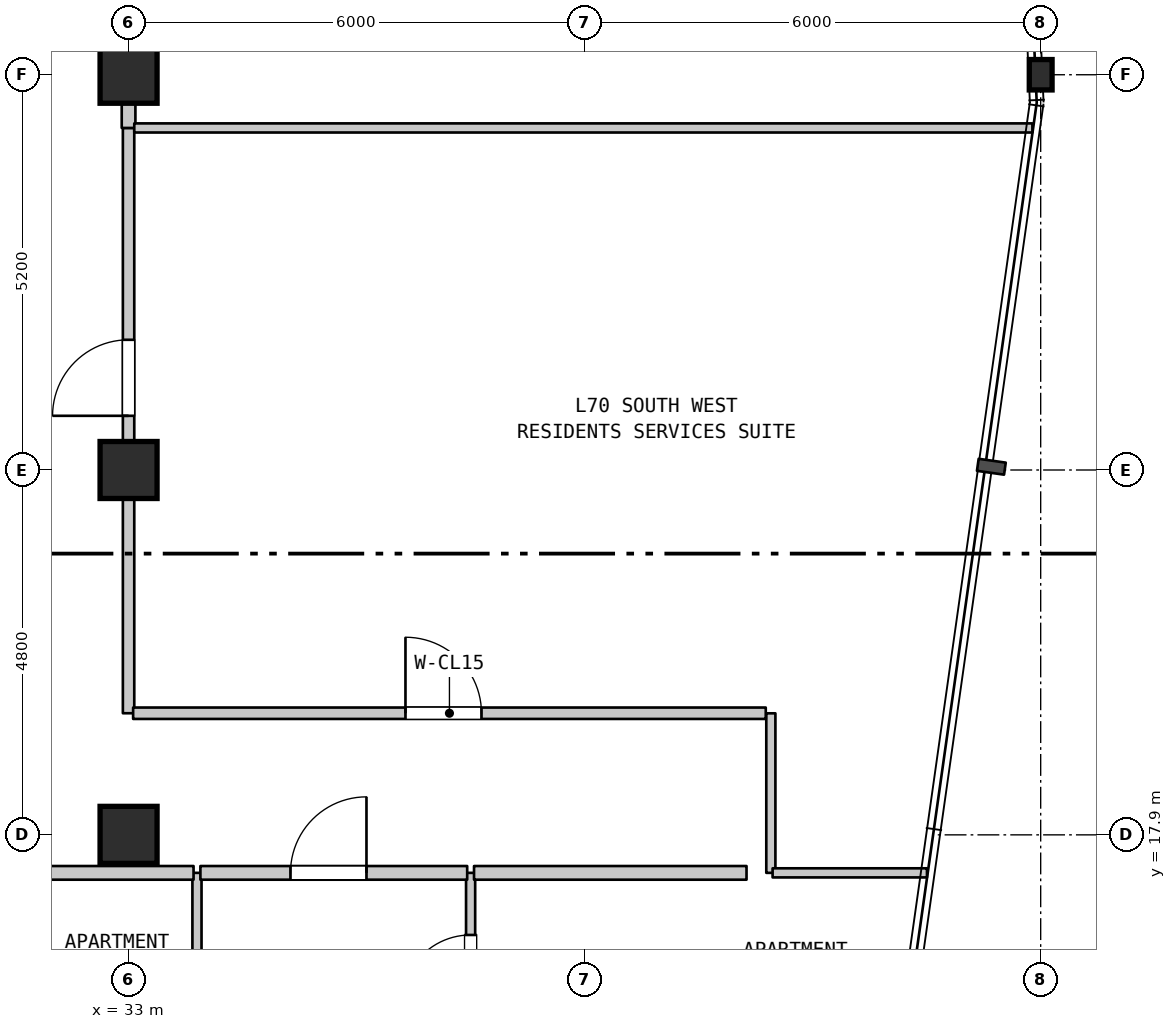
"""IFC4 building model, lengths in metres.
Left out: names, types, materials, properties, quantities, classifications, styles, units other than length and angle.
Written with IfcOpenShell. Run it as: python <this file> out.ifc"""

import sys

from ifc_helpers import new_model, si_unit, direction, frame, frame_2d, origin, origin_2d, place, context, subcontext, project, spatial, rectangle, i_section, extrude, element, fill, save


model = new_model("IFC4")
c1 = context("Model", 3, precision=1e-05, world=origin(), true_north=direction((0.0, 1.0)))
c2 = subcontext(c1, "Body", "Model", "MODEL_VIEW")
j1 = project(units=[si_unit("LENGTHUNIT", "METRE"), si_unit("PLANEANGLEUNIT", "RADIAN")], contexts=[c1])
p1 = place(None, origin())
s1 = spatial("IfcSite", under=j1, at=p1, CompositionType="ELEMENT")
p2 = place(p1, origin())
s2 = spatial("IfcBuilding", under=s1, at=p2, CompositionType="ELEMENT")
p3 = place(p2, frame((0.0, 0.0, 280.6)))
s3 = spatial("IfcBuildingStorey", under=s2, at=p3, CompositionType="ELEMENT", Elevation=280.6)
for number, where, z_axis, x_axis in (
    (1, (33.0, 17.9, 0.0), (0.0, 0.0, 1.0), (1.0, 0.0, 0.0)),
    (2, (33.0, 22.7, 0.0), (0.0, 0.0, 1.0), (1.0, 0.0, 0.0)),
    (3, (33.0, 27.9, 0.0), (0.0, 0.0, 1.0), (1.0, 0.0, 0.0)),
):
    element("IfcColumn", number, at=place(p3, frame(where, z_axis=z_axis, x_axis=x_axis)), inside=s3, PredefinedType="COLUMN", context=c2, shape_type="SweptSolid", body=[
        extrude(rectangle(XDim=0.75, YDim=0.75, at=origin_2d()), origin(), (0.0, 0.0, 1.0), 3.7),
    ])
p4 = place(p3, frame((45.0, 27.9, 0.0), z_axis=(0.0, 0.0, 1.0), x_axis=(1.0, 0.0, 0.0)))
e4 = element("IfcColumn", 4, at=p4, inside=s3, PredefinedType="COLUMN", context=c2, shape_type="SweptSolid", body=[
    extrude(i_section(OverallWidth=0.3, OverallDepth=0.4, WebThickness=0.013, FlangeThickness=0.024, FilletRadius=0.027, at=origin_2d()), origin(), (0.0, 0.0, 1.0), 3.7),
])
p5 = place(p3, frame((33.0, 19.5, 0.0), z_axis=(0.0, 0.0, 1.0), x_axis=(0.0, 1.0, 0.0)))
e5 = element("IfcWall", 5, at=p5, inside=s3, PredefinedType="STANDARD", context=c2, shape_type="SweptSolid", body=[
    extrude(rectangle(XDim=7.7, YDim=0.15, at=frame_2d((3.85, 0.0))), origin(), (0.0, 0.0, 1.0), 3.1),
])
p6 = place(p5, frame((3.913, 0.0, 0.0)))
e6 = element("IfcOpeningElement", 6, at=p6, cuts=e5, PredefinedType="OPENING", context=c2, shape_type="SweptSolid", body=[
    extrude(rectangle(XDim=1.0, YDim=2.15, at=frame_2d((0.5, 1.075))), frame((0.0, 0.085, 0.0), z_axis=(0.0, -1.0, 0.0), x_axis=(1.0, 0.0, 0.0)), (0.0, 0.0, 1.0), 0.17),
])
p7 = place(p3, frame((33.0, 27.2, 0.0), z_axis=(0.0, 0.0, 1.0), x_axis=(0.0, 1.0, 0.0)))
e7 = element("IfcWall", 7, at=p7, inside=s3, PredefinedType="STANDARD", context=c2, shape_type="SweptSolid", body=[
    extrude(rectangle(XDim=0.7, YDim=0.18, at=frame_2d((0.35, 0.0))), origin(), (0.0, 0.0, 1.0), 3.1),
])
p8 = place(p3, frame((33.9, 15.008, 0.0), z_axis=(0.0, 0.0, 1.0), x_axis=(0.0, 1.0, 0.0)))
e8 = element("IfcWall", 8, at=p8, inside=s3, PredefinedType="PARTITIONING", context=c2, shape_type="SweptSolid", body=[
    extrude(rectangle(XDim=2.392, YDim=0.12, at=frame_2d((1.196, 0.0))), origin(), (0.0, 0.0, 1.0), 3.39),
])
p9 = place(p3, frame((37.5, 15.008, 0.0), z_axis=(0.0, 0.0, 1.0), x_axis=(0.0, 1.0, 0.0)))
e9 = element("IfcWall", 9, at=p9, inside=s3, PredefinedType="PARTITIONING", context=c2, shape_type="SweptSolid", body=[
    extrude(rectangle(XDim=2.392, YDim=0.12, at=frame_2d((1.196, 0.0))), origin(), (0.0, 0.0, 1.0), 3.39),
])
p10 = place(p9, frame((0.675, 0.0, 0.0)))
e10 = element("IfcOpeningElement", 10, at=p10, cuts=e9, PredefinedType="OPENING", context=c2, shape_type="SweptSolid", body=[
    extrude(rectangle(XDim=0.9, YDim=2.1, at=frame_2d((0.45, 1.05))), frame((0.0, 0.07, 0.0), z_axis=(0.0, -1.0, 0.0), x_axis=(1.0, 0.0, 0.0)), (0.0, 0.0, 1.0), 0.14),
])
p11 = place(p3, frame((41.45, 17.4, 0.0), z_axis=(0.0, 0.0, 1.0), x_axis=(0.0, 1.0, 0.0)))
e11 = element("IfcWall", 11, at=p11, inside=s3, PredefinedType="PARTITIONING", context=c2, shape_type="SweptSolid", body=[
    extrude(rectangle(XDim=2.099, YDim=0.12, at=frame_2d((1.05, 0.0))), origin(), (0.0, 0.0, 1.0), 3.39),
])
p12 = place(p3, frame((31.245, 17.4, 0.0), z_axis=(0.0, 0.0, 1.0), x_axis=(1.0, 0.0, 0.0)))
e12 = element("IfcWall", 12, at=p12, inside=s3, PredefinedType="STANDARD", context=c2, shape_type="SweptSolid", body=[
    extrude(rectangle(XDim=2.61, YDim=0.18, at=frame_2d((1.305, 0.0))), origin(), (0.0, 0.0, 1.0), 3.39),
])
p13 = place(p3, frame((33.945, 17.4, 0.0), z_axis=(0.0, 0.0, 1.0), x_axis=(1.0, 0.0, 0.0)))
e13 = element("IfcWall", 13, at=p13, inside=s3, PredefinedType="STANDARD", context=c2, shape_type="SweptSolid", body=[
    extrude(rectangle(XDim=3.51, YDim=0.18, at=frame_2d((1.755, 0.0))), origin(), (0.0, 0.0, 1.0), 3.39),
])
p14 = place(p13, frame((1.185, 0.0, 0.0)))
e14 = element("IfcOpeningElement", 14, at=p14, cuts=e13, PredefinedType="OPENING", context=c2, shape_type="SweptSolid", body=[
    extrude(rectangle(XDim=1.0, YDim=2.15, at=frame_2d((0.5, 1.075))), frame((0.0, 0.1, 0.0), z_axis=(0.0, -1.0, 0.0), x_axis=(1.0, 0.0, 0.0)), (0.0, 0.0, 1.0), 0.2),
])
p15 = place(p3, frame((37.545, 17.4, 0.0), z_axis=(0.0, 0.0, 1.0), x_axis=(1.0, 0.0, 0.0)))
e15 = element("IfcWall", 15, at=p15, inside=s3, PredefinedType="STANDARD", context=c2, shape_type="SweptSolid", body=[
    extrude(rectangle(XDim=3.585, YDim=0.18, at=frame_2d((1.792, 0.0))), origin(), (0.0, 0.0, 1.0), 3.39),
])
p16 = place(p3, frame((41.473, 17.4, 0.0), z_axis=(0.0, 0.0, 1.0), x_axis=(1.0, 0.0, 0.0)))
e16 = element("IfcWall", 16, at=p16, inside=s3, PredefinedType="PARTITIONING", context=c2, shape_type="SweptSolid", body=[
    extrude(rectangle(XDim=2.031, YDim=0.12, at=frame_2d((1.016, 0.0))), origin(), (0.0, 0.0, 1.0), 3.39),
])
p17 = place(p3, frame((33.06, 19.5, 0.0), z_axis=(0.0, 0.0, 1.0), x_axis=(1.0, 0.0, 0.0)))
e17 = element("IfcWall", 17, at=p17, inside=s3, PredefinedType="STANDARD", context=c2, shape_type="SweptSolid", body=[
    extrude(rectangle(XDim=8.323, YDim=0.15, at=frame_2d((4.162, 0.0))), origin(), (0.0, 0.0, 1.0), 3.39),
])
p18 = place(p17, frame((3.583, 0.0, 0.0)))
e18 = element("IfcOpeningElement", 18, at=p18, cuts=e17, PredefinedType="OPENING", context=c2, shape_type="SweptSolid", body=[
    extrude(rectangle(XDim=1.0, YDim=2.15, at=frame_2d((0.5, 1.075))), frame((0.0, 0.085, 0.0), z_axis=(0.0, -1.0, 0.0), x_axis=(1.0, 0.0, 0.0)), (0.0, 0.0, 1.0), 0.17),
])
p19 = place(p3, frame((33.075, 27.2, 0.0), z_axis=(0.0, 0.0, 1.0), x_axis=(1.0, 0.0, 0.0)))
e19 = element("IfcWall", 19, at=p19, inside=s3, PredefinedType="PARTITIONING", context=c2, shape_type="SweptSolid", body=[
    extrude(rectangle(XDim=11.816, YDim=0.12, at=frame_2d((5.908, 0.0))), origin(), (0.0, 0.0, 1.0), 3.39),
])
p20 = place(p3, frame((33.0, 27.9, 0.0), z_axis=(0.0, 0.0, 1.0), x_axis=(0.0, 1.0, 0.0)))
e20 = element("IfcWall", 20, at=p20, inside=s3, PredefinedType="STANDARD", context=c2, shape_type="SweptSolid", body=[
    extrude(rectangle(XDim=2.7, YDim=0.18, at=frame_2d((1.35, 0.0))), origin(), (0.0, 0.0, 1.0), 2.89),
])
p21 = place(p20, frame((0.718, 0.0, 0.0)))
e21 = element("IfcOpeningElement", 21, at=p21, cuts=e20, PredefinedType="OPENING", context=c2, shape_type="SweptSolid", body=[
    extrude(rectangle(XDim=1.0, YDim=2.15, at=frame_2d((0.5, 1.075))), frame((0.0, 0.1, 0.0), z_axis=(0.0, -1.0, 0.0), x_axis=(1.0, 0.0, 0.0)), (0.0, 0.0, 1.0), 0.2),
])
p22 = place(p6, origin())
e22 = element("IfcDoor", 22, at=p22, inside=s3, OperationType="SINGLE_SWING_LEFT", PredefinedType="DOOR", context=c2, shape_type="SweptSolid", body=[
    extrude(rectangle(XDim=1.0, YDim=2.15, at=frame_2d((0.5, 1.075))), frame((0.0, 0.025, 0.0), z_axis=(0.0, -1.0, 0.0), x_axis=(1.0, 0.0, 0.0)), (0.0, 0.0, 1.0), 0.05),
])
fill(e6, e22)
p23 = place(p10, origin())
e23 = element("IfcDoor", 23, at=p23, inside=s3, OperationType="SINGLE_SWING_LEFT", PredefinedType="DOOR", context=c2, shape_type="SweptSolid", body=[
    extrude(rectangle(XDim=0.9, YDim=2.1, at=frame_2d((0.45, 1.05))), frame((0.0, 0.025, 0.0), z_axis=(0.0, -1.0, 0.0), x_axis=(1.0, 0.0, 0.0)), (0.0, 0.0, 1.0), 0.05),
])
fill(e10, e23)
p24 = place(p14, origin())
e24 = element("IfcDoor", 24, at=p24, inside=s3, OperationType="SINGLE_SWING_RIGHT", PredefinedType="DOOR", context=c2, shape_type="SweptSolid", body=[
    extrude(rectangle(XDim=1.0, YDim=2.15, at=frame_2d((0.5, 1.075))), frame((0.0, 0.025, 0.0), z_axis=(0.0, -1.0, 0.0), x_axis=(1.0, 0.0, 0.0)), (0.0, 0.0, 1.0), 0.05),
])
fill(e14, e24)
p25 = place(p18, origin())
e25 = element("IfcDoor", 25, at=p25, inside=s3, OperationType="SINGLE_SWING_LEFT", PredefinedType="DOOR", context=c2, shape_type="SweptSolid", body=[
    extrude(rectangle(XDim=1.0, YDim=2.15, at=frame_2d((0.5, 1.075))), frame((0.0, 0.025, 0.0), z_axis=(0.0, -1.0, 0.0), x_axis=(1.0, 0.0, 0.0)), (0.0, 0.0, 1.0), 0.05),
])
fill(e18, e25)
save(model, sys.argv[1])
